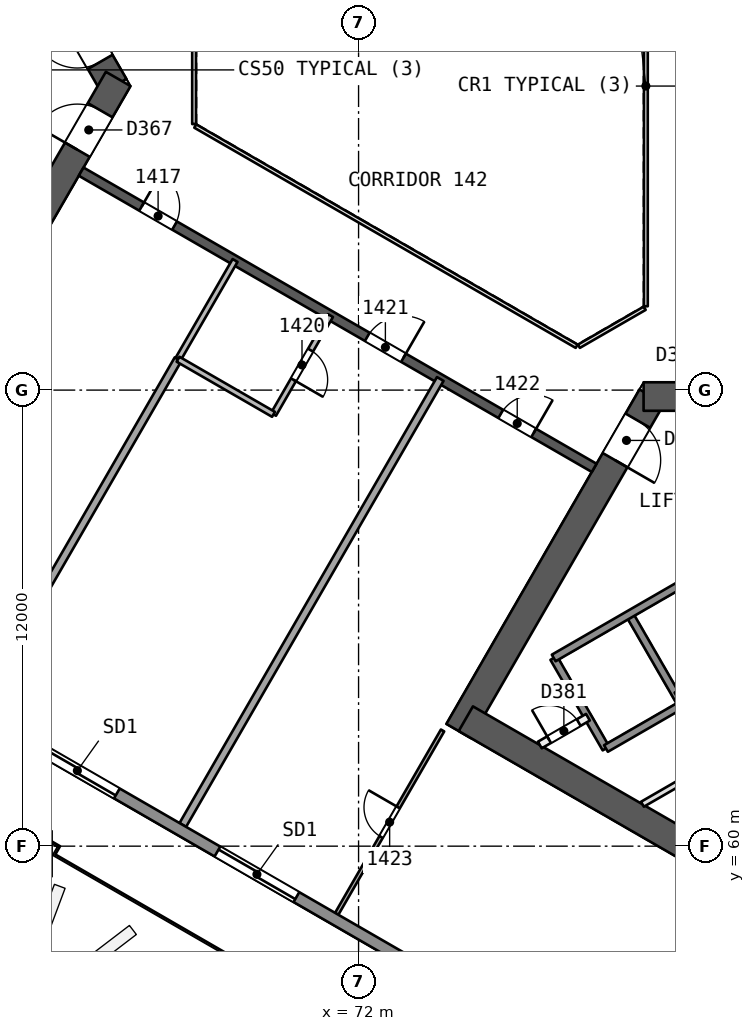
"""IFC4 building model, lengths in metres.
Left out: names, types, materials, properties, quantities, classifications, styles, units other than length and angle.
Written with IfcOpenShell. Run it as: python <this file> out.ifc"""

import sys

from ifc_helpers import new_model, si_unit, direction, frame, frame_2d, origin, origin_2d, place, context, subcontext, project, spatial, rectangle, extrude, element, fill, save


model = new_model("IFC4")
c1 = context("Model", 3, precision=1e-05, world=origin(), true_north=direction((0.0, 1.0)))
c2 = subcontext(c1, "Body", "Model", "MODEL_VIEW")
j1 = project(units=[si_unit("LENGTHUNIT", "METRE"), si_unit("PLANEANGLEUNIT", "RADIAN")], contexts=[c1])
p1 = place(None, origin())
s1 = spatial("IfcSite", under=j1, at=p1, CompositionType="ELEMENT")
p2 = place(p1, origin())
s2 = spatial("IfcBuilding", under=s1, at=p2, CompositionType="ELEMENT")
p3 = place(p2, frame((0.0, 0.0, 64.7)))
s3 = spatial("IfcBuildingStorey", under=s2, at=p3, CompositionType="ELEMENT", Elevation=64.7)
p4 = place(p3, frame((65.567, 80.0, 0.0), z_axis=(0.0, 0.0, 1.0), x_axis=(-0.499988615364, 0.866031976607, 0.0)))
e1 = element("IfcWall", 1, at=p4, inside=s3, PredefinedType="SHEAR", context=c2, shape_type="SweptSolid", body=[
    extrude(rectangle(XDim=10.163, YDim=0.75, at=frame_2d((5.082, 0.0))), origin(), (0.0, 0.0, 1.0), 3.7),
])
p5 = place(p4, frame((0.733, 0.0, 0.0)))
e2 = element("IfcOpeningElement", 2, at=p5, cuts=e1, PredefinedType="OPENING", context=c2, shape_type="SweptSolid", body=[
    extrude(rectangle(XDim=1.2, YDim=2.1, at=frame_2d((0.6, 1.05))), frame((0.0, 0.385, 0.0), z_axis=(0.0, -1.0, 0.0), x_axis=(1.0, 0.0, 0.0)), (0.0, 0.0, 1.0), 0.771),
])
p6 = place(p3, frame((60.673, 71.523, 0.0), z_axis=(0.0, 0.0, 1.0), x_axis=(0.499997052475, 0.866027105532, 0.0)))
e3 = element("IfcWall", 3, at=p6, inside=s3, PredefinedType="SHEAR", context=c2, shape_type="SweptSolid", body=[
    extrude(rectangle(XDim=10.005, YDim=0.75, at=frame_2d((5.002, 0.0))), origin(), (0.0, 0.0, 1.0), 3.7),
])
p7 = place(p6, frame((7.855, 0.0, 0.0)))
e4 = element("IfcOpeningElement", 4, at=p7, cuts=e3, PredefinedType="OPENING", context=c2, shape_type="SweptSolid", body=[
    extrude(rectangle(XDim=1.2, YDim=2.1, at=frame_2d((0.6, 1.05))), frame((0.0, 0.385, 0.0), z_axis=(0.0, -1.0, 0.0), x_axis=(1.0, 0.0, 0.0)), (0.0, 0.0, 1.0), 0.771),
])
p8 = place(p3, frame((79.717, 71.831, 0.0), z_axis=(0.0, 0.0, 1.0), x_axis=(-0.499996230114, -0.866027580318, 0.0)))
e5 = element("IfcWall", 5, at=p8, inside=s3, PredefinedType="SHEAR", context=c2, shape_type="SweptSolid", body=[
    extrude(rectangle(XDim=10.164, YDim=0.75, at=frame_2d((5.082, 0.0))), origin(), (0.0, 0.0, 1.0), 3.7),
])
p9 = place(p8, frame((0.733, 0.0, 0.0)))
e6 = element("IfcOpeningElement", 6, at=p9, cuts=e5, PredefinedType="OPENING", context=c2, shape_type="SweptSolid", body=[
    extrude(rectangle(XDim=1.2, YDim=2.1, at=frame_2d((0.6, 1.05))), frame((0.0, 0.385, 0.0), z_axis=(0.0, -1.0, 0.0), x_axis=(1.0, 0.0, 0.0)), (0.0, 0.0, 1.0), 0.771),
])
p10 = place(p3, frame((74.822, 63.354, 0.0), z_axis=(0.0, 0.0, 1.0), x_axis=(0.8660248072, -0.500001033313, 0.0)))
e7 = element("IfcWall", 7, at=p10, inside=s3, PredefinedType="SHEAR", context=c2, shape_type="SweptSolid", body=[
    extrude(rectangle(XDim=13.958, YDim=0.75, at=frame_2d((6.979, 0.0))), origin(), (0.0, 0.0, 1.0), 3.7),
])
p11 = place(p3, frame((89.505, 71.831, 0.0), z_axis=(0.0, 0.0, 1.0), x_axis=(-1.0, 0.0, 0.0)))
e8 = element("IfcWall", 8, at=p11, inside=s3, PredefinedType="SHEAR", context=c2, shape_type="SweptSolid", body=[
    extrude(rectangle(XDim=10.005, YDim=0.75, at=frame_2d((5.002, 0.0))), origin(), (0.0, 0.0, 1.0), 3.7),
])
p12 = place(p11, frame((7.855, 0.0, 0.0)))
e9 = element("IfcOpeningElement", 9, at=p12, cuts=e8, PredefinedType="OPENING", context=c2, shape_type="SweptSolid", body=[
    extrude(rectangle(XDim=1.2, YDim=2.1, at=frame_2d((0.6, 1.05))), frame((0.0, 0.385, 0.0), z_axis=(0.0, -1.0, 0.0), x_axis=(1.0, 0.0, 0.0)), (0.0, 0.0, 1.0), 0.771),
])
p13 = place(p3, frame((64.7, 77.748, 0.0), z_axis=(0.0, 0.0, 1.0), x_axis=(0.866026492143, -0.499998114903, 0.0)))
e10 = element("IfcWall", 10, at=p13, inside=s3, PredefinedType="SHEAR", context=c2, shape_type="SweptSolid", body=[
    extrude(rectangle(XDim=15.588, YDim=0.25, at=frame_2d((7.794, 0.0))), origin(), (0.0, 0.0, 1.0), 3.2),
])
p14 = place(p13, frame((1.838, 0.0, 0.0)))
e11 = element("IfcOpeningElement", 11, at=p14, cuts=e10, PredefinedType="OPENING", context=c2, shape_type="SweptSolid", body=[
    extrude(rectangle(XDim=1.0, YDim=2.1, at=frame_2d((0.5, 1.05))), frame((0.0, 0.135, 0.0), z_axis=(0.0, -1.0, 0.0), x_axis=(1.0, 0.0, 0.0)), (0.0, 0.0, 1.0), 0.271),
])
p15 = place(p13, frame((8.694, 0.0, 0.0)))
e12 = element("IfcOpeningElement", 12, at=p15, cuts=e10, PredefinedType="OPENING", context=c2, shape_type="SweptSolid", body=[
    extrude(rectangle(XDim=1.1, YDim=2.1, at=frame_2d((0.55, 1.05))), frame((0.0, 0.135, 0.0), z_axis=(0.0, -1.0, 0.0), x_axis=(1.0, 0.0, 0.0)), (0.0, 0.0, 1.0), 0.271),
])
p16 = place(p13, frame((12.75, 0.0, 0.0)))
e13 = element("IfcOpeningElement", 13, at=p16, cuts=e10, PredefinedType="OPENING", context=c2, shape_type="SweptSolid", body=[
    extrude(rectangle(XDim=1.0, YDim=2.1, at=frame_2d((0.5, 1.05))), frame((0.0, 0.135, 0.0), z_axis=(0.0, -1.0, 0.0), x_axis=(1.0, 0.0, 0.0)), (0.0, 0.0, 1.0), 0.271),
])
p17 = place(p3, frame((63.325, 59.779, 0.0), z_axis=(0.010093620709, 0.017482414954, 0.999796221231), x_axis=(-0.866022643586, 0.500004780773, 1.3036e-08)))
e14 = element("IfcColumn", 14, at=p17, inside=s3, PredefinedType="COLUMN", context=c2, shape_type="SweptSolid", body=[
    extrude(rectangle(XDim=1.1, YDim=1.1, at=origin_2d()), origin(), (0.0, 0.0, 1.0), 3.701),
])
p18 = place(p3, frame((61.975, 63.675, 0.0), z_axis=(0.0, 0.0, 1.0), x_axis=(0.499994206371, 0.866028748712, 0.0)))
e15 = element("IfcWall", 15, at=p18, inside=s3, PredefinedType="PARTITIONING", context=c2, shape_type="SweptSolid", body=[
    extrude(rectangle(XDim=10.551, YDim=0.2, at=frame_2d((5.275, 0.0))), origin(), (0.0, 0.0, 1.0), 3.2),
])
p19 = place(p3, frame((67.25, 72.812, 0.0), z_axis=(0.0, 0.0, 1.0), x_axis=(0.499990139034, 0.866031096941, 0.0)))
e16 = element("IfcWall", 16, at=p19, inside=s3, PredefinedType="PARTITIONING", context=c2, shape_type="SweptSolid", body=[
    extrude(rectangle(XDim=3.0, YDim=0.15, at=frame_2d((1.5, 0.0))), origin(), (0.0, 0.0, 1.0), 3.2),
])
p20 = place(p3, frame((71.261, 73.96, 0.0), z_axis=(0.0, 0.0, 1.0), x_axis=(-0.50002537861, -0.866010750942, 0.0)))
e17 = element("IfcWall", 17, at=p20, inside=s3, PredefinedType="PARTITIONING", context=c2, shape_type="SweptSolid", body=[
    extrude(rectangle(XDim=3.0, YDim=0.15, at=frame_2d((1.5, 0.0))), origin(), (0.0, 0.0, 1.0), 3.2),
])
p21 = place(p20, frame((1.05, 0.0, 0.0)))
e18 = element("IfcOpeningElement", 18, at=p21, cuts=e17, PredefinedType="OPENING", context=c2, shape_type="SweptSolid", body=[
    extrude(rectangle(XDim=0.9, YDim=2.1, at=frame_2d((0.45, 1.05))), frame((0.0, 0.085, 0.0), z_axis=(0.0, -1.0, 0.0), x_axis=(1.0, 0.0, 0.0)), (0.0, 0.0, 1.0), 0.171),
])
p22 = place(p3, frame((69.761, 71.362, 0.0), z_axis=(0.0, 0.0, 1.0), x_axis=(-0.866032775405, 0.499987231761, 0.0)))
e19 = element("IfcWall", 19, at=p22, inside=s3, PredefinedType="PARTITIONING", context=c2, shape_type="SweptSolid", body=[
    extrude(rectangle(XDim=2.9, YDim=0.15, at=frame_2d((1.45, 0.0))), origin(), (0.0, 0.0, 1.0), 3.2),
])
p23 = place(p3, frame((67.375, 60.557, 0.0), z_axis=(0.0, 0.0, 1.0), x_axis=(0.499993305868, 0.866029268609, 0.0)))
e20 = element("IfcWall", 20, at=p23, inside=s3, PredefinedType="PARTITIONING", context=c2, shape_type="SweptSolid", body=[
    extrude(rectangle(XDim=13.551, YDim=0.2, at=frame_2d((6.775, 0.0))), origin(), (0.0, 0.0, 1.0), 3.2),
])
p24 = place(p3, frame((71.425, 58.219, 0.0), z_axis=(0.0, 0.0, 1.0), x_axis=(0.499975327912, 0.866039647752, 0.0)))
e21 = element("IfcWall", 21, at=p24, inside=s3, PredefinedType="PARTITIONING", context=c2, shape_type="SweptSolid", body=[
    extrude(rectangle(XDim=5.572, YDim=0.1, at=frame_2d((2.786, 0.0))), origin(), (0.0, 0.0, 1.0), 3.2),
])
p25 = place(p24, frame((2.336, 0.0, 0.0)))
e22 = element("IfcOpeningElement", 22, at=p25, cuts=e21, PredefinedType="OPENING", context=c2, shape_type="SweptSolid", body=[
    extrude(rectangle(XDim=0.9, YDim=2.1, at=frame_2d((0.45, 1.05))), frame((0.0, 0.061, 0.0), z_axis=(0.0, -1.0, 0.0), x_axis=(1.0, 0.0, 0.0)), (0.0, 0.0, 1.0), 0.121),
])
p26 = place(p3, frame((90.499, 47.034, 0.0), z_axis=(0.0, 0.0, 1.0), x_axis=(-0.866026049211, 0.499998882086, 0.0)))
e23 = element("IfcWall", 23, at=p26, inside=s3, PredefinedType="SOLIDWALL", context=c2, shape_type="SweptSolid", body=[
    extrude(rectangle(XDim=59.811, YDim=0.3, at=frame_2d((29.905, 0.0))), origin(), (0.0, 0.0, 1.0), 3.2),
])
p27 = place(p26, frame((28.705, 0.0, 0.0)))
e24 = element("IfcOpeningElement", 24, at=p27, cuts=e23, PredefinedType="OPENING", context=c2, shape_type="SweptSolid", body=[
    extrude(rectangle(XDim=2.4, YDim=2.4, at=frame_2d((1.2, 1.2))), frame((0.0, 0.161, 0.0), z_axis=(0.0, -1.0, 0.0), x_axis=(1.0, 0.0, 0.0)), (0.0, 0.0, 1.0), 0.321),
])
p28 = place(p26, frame((34.161, 0.0, 0.0)))
e25 = element("IfcOpeningElement", 25, at=p28, cuts=e23, PredefinedType="OPENING", context=c2, shape_type="SweptSolid", body=[
    extrude(rectangle(XDim=2.4, YDim=2.4, at=frame_2d((1.2, 1.2))), frame((0.0, 0.161, 0.0), z_axis=(0.0, -1.0, 0.0), x_axis=(1.0, 0.0, 0.0)), (0.0, 0.0, 1.0), 0.321),
])
p29 = place(p26, frame((46.394, 0.0, 0.0)))
e26 = element("IfcOpeningElement", 26, at=p29, cuts=e23, PredefinedType="OPENING", context=c2, shape_type="SweptSolid", body=[
    extrude(rectangle(XDim=2.4, YDim=2.4, at=frame_2d((1.2, 1.2))), frame((0.0, 0.161, 0.0), z_axis=(0.0, -1.0, 0.0), x_axis=(1.0, 0.0, 0.0)), (0.0, 0.0, 1.0), 0.321),
])
p30 = place(p26, frame((23.249, 0.0, 0.0)))
e27 = element("IfcOpeningElement", 27, at=p30, cuts=e23, PredefinedType="OPENING", context=c2, shape_type="SweptSolid", body=[
    extrude(rectangle(XDim=2.4, YDim=2.4, at=frame_2d((1.2, 1.2))), frame((0.0, 0.161, 0.0), z_axis=(0.0, -1.0, 0.0), x_axis=(1.0, 0.0, 0.0)), (0.0, 0.0, 1.0), 0.321),
])
p31 = place(p26, frame((11.002, 0.0, 0.0)))
e28 = element("IfcOpeningElement", 28, at=p31, cuts=e23, PredefinedType="OPENING", context=c2, shape_type="SweptSolid", body=[
    extrude(rectangle(XDim=2.4, YDim=2.4, at=frame_2d((1.2, 1.2))), frame((0.0, 0.161, 0.0), z_axis=(0.0, -1.0, 0.0), x_axis=(1.0, 0.0, 0.0)), (0.0, 0.0, 1.0), 0.321),
])
for number, where, z_axis, x_axis in (
    (29, (77.135, 64.952, 0.0), (0.0, 0.0, 1.0), (0.5, -0.866, 0.0)),
    (30, (79.127, 66.102, 0.0), (0.0, 0.0, 1.0), (0.5, -0.866, 0.0)),
):
    element("IfcWall", number, at=place(p3, frame(where, z_axis=z_axis, x_axis=x_axis)), inside=s3, PredefinedType="SOLIDWALL", context=c2, shape_type="SweptSolid", body=[
        extrude(rectangle(XDim=2.75, YDim=0.2, at=frame_2d((1.375, 0.0))), origin(), (0.0, 0.0, 1.0), 3.2),
    ])
p32 = place(p3, frame((77.135, 64.952, 0.0), z_axis=(0.0, 0.0, 1.0), x_axis=(0.866031916153, 0.499988720078, 0.0)))
e31 = element("IfcWall", 31, at=p32, inside=s3, PredefinedType="SOLIDWALL", context=c2, shape_type="SweptSolid", body=[
    extrude(rectangle(XDim=11.35, YDim=0.2, at=frame_2d((5.675, 0.0))), origin(), (0.0, 0.0, 1.0), 3.2),
])
p33 = place(p3, frame((76.77, 62.662, 0.0), z_axis=(0.0, 0.0, 1.0), x_axis=(0.866054810376, 0.49994906283, 0.0)))
e32 = element("IfcWall", 32, at=p33, inside=s3, PredefinedType="PARTITIONING", context=c2, shape_type="SweptSolid", body=[
    extrude(rectangle(XDim=1.461, YDim=0.2, at=frame_2d((0.73, 0.0))), origin(), (0.0, 0.0, 1.0), 3.2),
])
p34 = place(p33, frame((0.281, 0.0, 0.0)))
e33 = element("IfcOpeningElement", 33, at=p34, cuts=e32, PredefinedType="OPENING", context=c2, shape_type="SweptSolid", body=[
    extrude(rectangle(XDim=0.9, YDim=2.1, at=frame_2d((0.45, 1.05))), frame((0.0, 0.11, 0.0), z_axis=(0.0, -1.0, 0.0), x_axis=(1.0, 0.0, 0.0)), (0.0, 0.0, 1.0), 0.221),
])
p35 = place(p3, frame((80.367, 63.954, 0.0), z_axis=(0.0, 0.0, 1.0), x_axis=(0.866026575979, 0.499997969693, 0.0)))
e34 = element("IfcWall", 34, at=p35, inside=s3, PredefinedType="SOLIDWALL", context=c2, shape_type="SweptSolid", body=[
    extrude(rectangle(XDim=6.75, YDim=0.2, at=frame_2d((3.375, 0.0))), origin(), (0.0, 0.0, 1.0), 3.2),
])
p36 = place(p3, frame((78.51, 62.57, 0.0), z_axis=(0.0, 0.0, 1.0), x_axis=(0.866053019151, 0.499952165731, 0.0)))
e35 = element("IfcWall", 35, at=p36, inside=s3, PredefinedType="SOLIDWALL", context=c2, shape_type="SweptSolid", body=[
    extrude(rectangle(XDim=2.3, YDim=0.2, at=frame_2d((1.15, 0.0))), origin(), (0.0, 0.0, 1.0), 3.2),
])
p37 = place(p3, frame((79.47, 61.103, 0.0), z_axis=(0.0, 0.0, 1.0), x_axis=(0.866021168401, 0.500007335828, 0.0)))
e36 = element("IfcWall", 36, at=p37, inside=s3, PredefinedType="PARTITIONING", context=c2, shape_type="SweptSolid", body=[
    extrude(rectangle(XDim=2.077, YDim=0.15, at=frame_2d((1.039, 0.0))), origin(), (0.0, 0.0, 1.0), 3.2),
])
p38 = place(p3, frame((79.56, 74.206, 0.0), z_axis=(0.0, 0.0, 1.0), x_axis=(0.0, 1.0, 0.0)))
e37 = element("IfcWall", 37, at=p38, inside=s3, PredefinedType="PARTITIONING", context=c2, shape_type="SweptSolid", body=[
    extrude(rectangle(XDim=11.588, YDim=0.1, at=frame_2d((5.794, 0.0))), origin(), (0.0, 0.0, 1.0), 3.2),
])
p39 = place(p3, frame((67.672, 81.0, 0.0), z_axis=(0.0, 0.0, 1.0), x_axis=(0.0, -1.0, 0.0)))
e38 = element("IfcWall", 38, at=p39, inside=s3, PredefinedType="PARTITIONING", context=c2, shape_type="SweptSolid", body=[
    extrude(rectangle(XDim=2.0, YDim=0.1, at=frame_2d((1.0, 0.0))), origin(), (0.0, 0.0, 1.0), 3.2),
])
p40 = place(p3, frame((67.702, 78.948, 0.0), z_axis=(0.0, 0.0, 1.0), x_axis=(0.866026658274, -0.499997827154, 0.0)))
e39 = element("IfcWall", 39, at=p40, inside=s3, PredefinedType="PARTITIONING", context=c2, shape_type="SweptSolid", body=[
    extrude(rectangle(XDim=11.588, YDim=0.1, at=frame_2d((5.794, 0.0))), origin(), (0.0, 0.0, 1.0), 3.2),
])
p41 = place(p3, frame((77.798, 73.154, 0.0), z_axis=(0.0, 0.0, 1.0), x_axis=(0.866041268327, 0.499972520799, 0.0)))
e40 = element("IfcWall", 40, at=p41, inside=s3, PredefinedType="PARTITIONING", context=c2, shape_type="SweptSolid", body=[
    extrude(rectangle(XDim=2.0, YDim=0.1, at=frame_2d((1.0, 0.0))), origin(), (0.0, 0.0, 1.0), 3.2),
])
p42 = place(p14, origin())
e41 = element("IfcDoor", 41, at=p42, inside=s3, OperationType="SINGLE_SWING_LEFT", PredefinedType="NOTDEFINED", context=c2, shape_type="SweptSolid", body=[
    extrude(rectangle(XDim=1.0, YDim=2.1, at=frame_2d((0.5, 1.05))), frame((0.0, 0.025, 0.0), z_axis=(0.0, -1.0, 0.0), x_axis=(1.0, 0.0, 0.0)), (0.0, 0.0, 1.0), 0.05),
])
fill(e11, e41)
p43 = place(p21, origin())
e42 = element("IfcDoor", 42, at=p43, inside=s3, OperationType="SINGLE_SWING_RIGHT", PredefinedType="NOTDEFINED", context=c2, shape_type="SweptSolid", body=[
    extrude(rectangle(XDim=0.9, YDim=2.1, at=frame_2d((0.45, 1.05))), frame((0.0, 0.025, 0.0), z_axis=(0.0, -1.0, 0.0), x_axis=(1.0, 0.0, 0.0)), (0.0, 0.0, 1.0), 0.05),
])
fill(e18, e42)
p44 = place(p15, origin())
e43 = element("IfcDoor", 43, at=p44, inside=s3, OperationType="SINGLE_SWING_RIGHT", PredefinedType="NOTDEFINED", context=c2, shape_type="SweptSolid", body=[
    extrude(rectangle(XDim=1.1, YDim=2.1, at=frame_2d((0.55, 1.05))), frame((0.0, 0.025, 0.0), z_axis=(0.0, -1.0, 0.0), x_axis=(1.0, 0.0, 0.0)), (0.0, 0.0, 1.0), 0.05),
])
fill(e12, e43)
p45 = place(p16, origin())
e44 = element("IfcDoor", 44, at=p45, inside=s3, OperationType="SINGLE_SWING_RIGHT", PredefinedType="NOTDEFINED", context=c2, shape_type="SweptSolid", body=[
    extrude(rectangle(XDim=1.0, YDim=2.1, at=frame_2d((0.5, 1.05))), frame((0.0, 0.025, 0.0), z_axis=(0.0, -1.0, 0.0), x_axis=(1.0, 0.0, 0.0)), (0.0, 0.0, 1.0), 0.05),
])
fill(e13, e44)
p46 = place(p25, origin())
e45 = element("IfcDoor", 45, at=p46, inside=s3, OperationType="SINGLE_SWING_RIGHT", PredefinedType="NOTDEFINED", context=c2, shape_type="SweptSolid", body=[
    extrude(rectangle(XDim=0.9, YDim=2.1, at=frame_2d((0.45, 1.05))), frame((0.0, 0.025, 0.0), z_axis=(0.0, -1.0, 0.0), x_axis=(1.0, 0.0, 0.0)), (0.0, 0.0, 1.0), 0.05),
])
fill(e22, e45)
p47 = place(p27, origin())
e46 = element("IfcDoor", 46, at=p47, inside=s3, OperationType="SLIDING_TO_LEFT", PredefinedType="NOTDEFINED", context=c2, shape_type="SweptSolid", body=[
    extrude(rectangle(XDim=2.4, YDim=2.4, at=frame_2d((1.2, 1.2))), frame((0.0, 0.025, 0.0), z_axis=(0.0, -1.0, 0.0), x_axis=(1.0, 0.0, 0.0)), (0.0, 0.0, 1.0), 0.05),
])
fill(e24, e46)
p48 = place(p30, origin())
e47 = element("IfcDoor", 47, at=p48, inside=s3, OperationType="SLIDING_TO_RIGHT", PredefinedType="NOTDEFINED", context=c2, shape_type="SweptSolid", body=[
    extrude(rectangle(XDim=2.4, YDim=2.4, at=frame_2d((1.2, 1.2))), frame((0.0, 0.025, 0.0), z_axis=(0.0, -1.0, 0.0), x_axis=(1.0, 0.0, 0.0)), (0.0, 0.0, 1.0), 0.05),
])
fill(e27, e47)
p49 = place(p5, origin())
e48 = element("IfcDoor", 48, at=p49, inside=s3, OperationType="SINGLE_SWING_RIGHT", PredefinedType="NOTDEFINED", context=c2, shape_type="SweptSolid", body=[
    extrude(rectangle(XDim=1.2, YDim=2.1, at=frame_2d((0.6, 1.05))), frame((0.0, 0.025, 0.0), z_axis=(0.0, -1.0, 0.0), x_axis=(1.0, 0.0, 0.0)), (0.0, 0.0, 1.0), 0.05),
])
fill(e2, e48)
p50 = place(p7, origin())
e49 = element("IfcDoor", 49, at=p50, inside=s3, OperationType="SINGLE_SWING_LEFT", PredefinedType="NOTDEFINED", context=c2, shape_type="SweptSolid", body=[
    extrude(rectangle(XDim=1.2, YDim=2.1, at=frame_2d((0.6, 1.05))), frame((0.0, 0.025, 0.0), z_axis=(0.0, -1.0, 0.0), x_axis=(1.0, 0.0, 0.0)), (0.0, 0.0, 1.0), 0.05),
])
fill(e4, e49)
p51 = place(p9, origin())
e50 = element("IfcDoor", 50, at=p51, inside=s3, OperationType="SINGLE_SWING_RIGHT", PredefinedType="NOTDEFINED", context=c2, shape_type="SweptSolid", body=[
    extrude(rectangle(XDim=1.2, YDim=2.1, at=frame_2d((0.6, 1.05))), frame((0.0, 0.025, 0.0), z_axis=(0.0, -1.0, 0.0), x_axis=(1.0, 0.0, 0.0)), (0.0, 0.0, 1.0), 0.05),
])
fill(e6, e50)
p52 = place(p34, origin())
e51 = element("IfcDoor", 51, at=p52, inside=s3, OperationType="SINGLE_SWING_LEFT", PredefinedType="NOTDEFINED", context=c2, shape_type="SweptSolid", body=[
    extrude(rectangle(XDim=0.9, YDim=2.1, at=frame_2d((0.45, 1.05))), frame((0.0, 0.025, 0.0), z_axis=(0.0, -1.0, 0.0), x_axis=(1.0, 0.0, 0.0)), (0.0, 0.0, 1.0), 0.05),
])
fill(e33, e51)
save(model, sys.argv[1])
